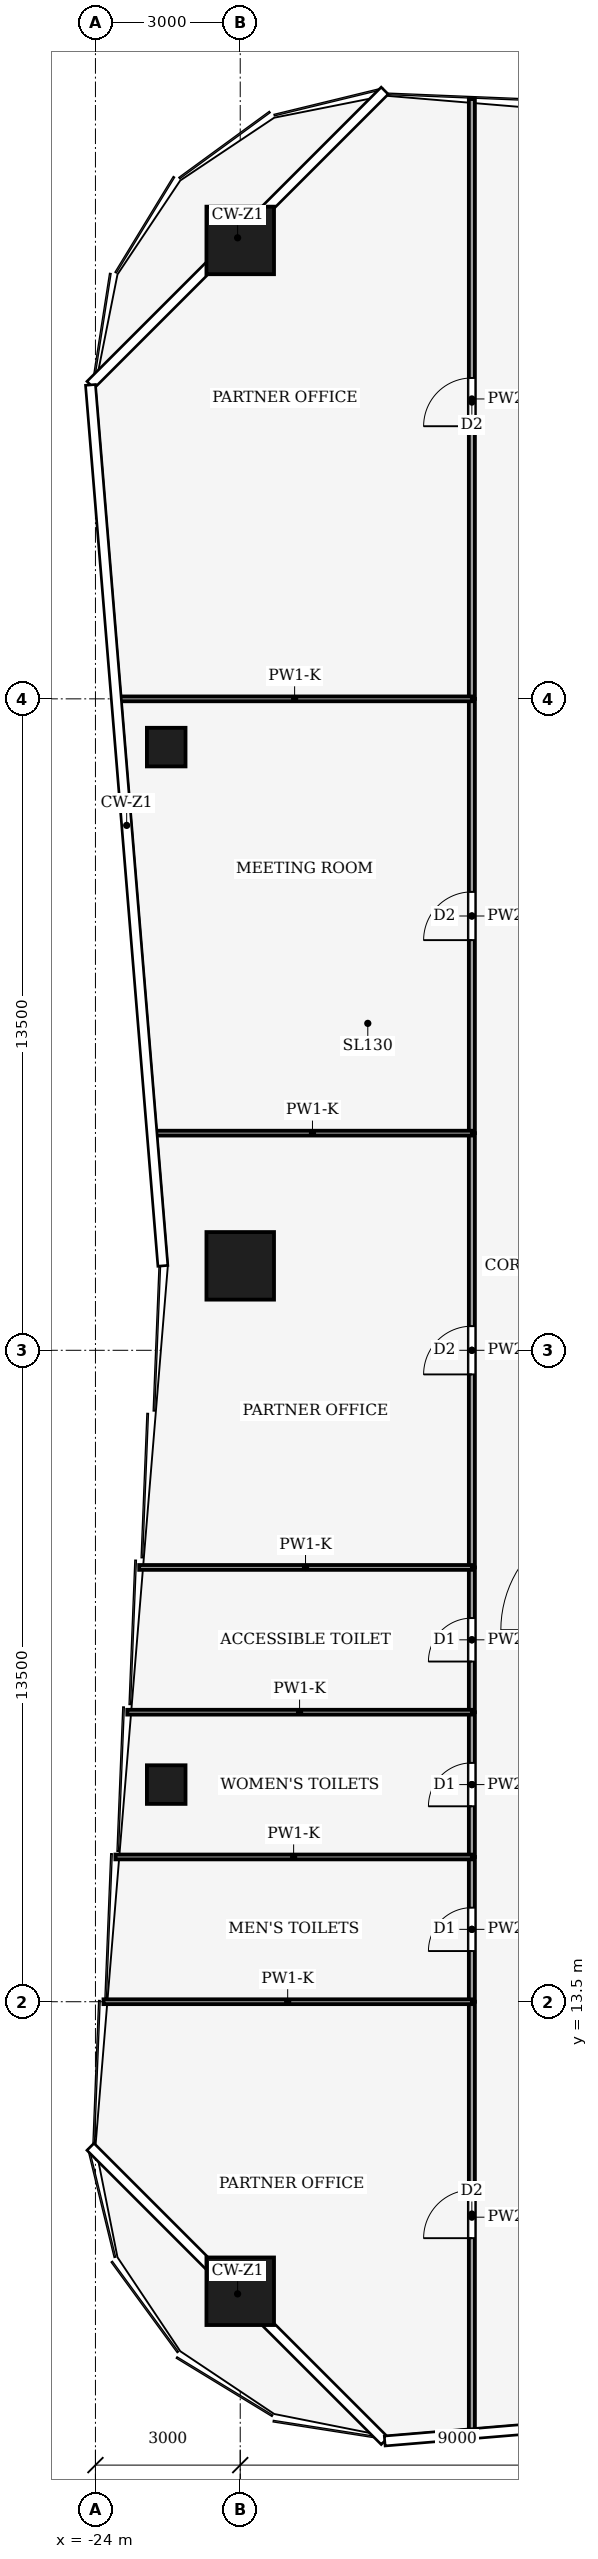
"""IFC4 building model, lengths in metres.
Left out: names, types, materials, properties, quantities, classifications, styles, units other than length and angle.
Written with IfcOpenShell. Run it as: python <this file> out.ifc"""

import sys

from ifc_helpers import new_model, si_unit, direction, frame, frame_2d, origin, origin_2d, place, context, subcontext, project, spatial, rectangle, hollow_rectangle, extrude, element, fill, save


model = new_model("IFC4")
c1 = context("Model", 3, precision=1e-05, world=origin(), true_north=direction((0.0, 1.0)))
c2 = subcontext(c1, "Body", "Model", "MODEL_VIEW")
j1 = project(units=[si_unit("LENGTHUNIT", "METRE"), si_unit("PLANEANGLEUNIT", "RADIAN")], contexts=[c1])
p1 = place(None, origin())
s1 = spatial("IfcSite", under=j1, at=p1, CompositionType="ELEMENT")
p2 = place(p1, origin())
s2 = spatial("IfcBuilding", under=s1, at=p2, CompositionType="ELEMENT")
p3 = place(p2, frame((0.0, 0.0, 110.0)))
s3 = spatial("IfcBuildingStorey", under=s2, at=p3, CompositionType="ELEMENT", Elevation=110.0)
for number, where, z_axis, x_axis in (
    (1, (-21.0, 50.0, 0.0), (0.0, 0.0, 1.0), (1.0, 0.0, 0.0)),
    (2, (-21.0, 7.5, 0.0), (0.0, 0.0, 1.0), (1.0, 0.0, 0.0)),
    (3, (-21.0, 28.75, 0.0), (0.0, 0.0, 1.0), (1.0, 0.0, 0.0)),
):
    element("IfcColumn", number, at=place(p3, frame(where, z_axis=z_axis, x_axis=x_axis)), inside=s3, PredefinedType="COLUMN", context=c2, shape_type="SweptSolid", body=[
        extrude(hollow_rectangle(XDim=1.4, YDim=1.4, WallThickness=0.08, at=origin_2d()), origin(), (0.0, 0.0, 1.0), 4.0),
    ])
for number, where, z_axis, x_axis in (
    (4, (-22.534, 18.0, 0.0), (0.0, 0.0, 1.0), (1.0, 0.0, 0.0)),
    (5, (-22.534, 39.5, 0.0), (0.0, 0.0, 1.0), (1.0, 0.0, 0.0)),
):
    element("IfcColumn", number, at=place(p3, frame(where, z_axis=z_axis, x_axis=x_axis)), inside=s3, PredefinedType="COLUMN", context=c2, shape_type="SweptSolid", body=[
        extrude(hollow_rectangle(XDim=0.8, YDim=0.8, WallThickness=0.04, at=origin_2d()), origin(), (0.0, 0.0, 1.0), 4.0),
    ])
p4 = place(p3, frame((-16.2, 4.57, 0.0), z_axis=(0.0, 0.0, 1.0), x_axis=(0.0, 1.0, 0.0)))
e6 = element("IfcWall", 6, at=p4, inside=s3, PredefinedType="PARTITIONING", context=c2, shape_type="SweptSolid", body=[
    extrude(rectangle(XDim=8.93, YDim=0.125, at=frame_2d((4.465, 0.0))), origin(), (0.0, 0.0, 1.0), 2.92),
])
p5 = place(p4, frame((4.03, 0.0, 0.0)))
e7 = element("IfcOpeningElement", 7, at=p5, cuts=e6, PredefinedType="OPENING", context=c2, shape_type="SweptSolid", body=[
    extrude(rectangle(XDim=1.0, YDim=2.1, at=frame_2d((0.5, 1.05))), frame((0.0, 0.073, 0.0), z_axis=(0.0, -1.0, 0.0), x_axis=(1.0, 0.0, 0.0)), (0.0, 0.0, 1.0), 0.145),
])
p6 = place(p3, frame((-16.2, 13.5, 0.0), z_axis=(0.0, 0.0, 1.0), x_axis=(0.0, 1.0, 0.0)))
e8 = element("IfcWall", 8, at=p6, inside=s3, PredefinedType="PARTITIONING", context=c2, shape_type="SweptSolid", body=[
    extrude(rectangle(XDim=3.0, YDim=0.125, at=frame_2d((1.5, 0.0))), origin(), (0.0, 0.0, 1.0), 3.75),
])
p7 = place(p6, frame((1.05, 0.0, 0.0)))
e9 = element("IfcOpeningElement", 9, at=p7, cuts=e8, PredefinedType="OPENING", context=c2, shape_type="SweptSolid", body=[
    extrude(rectangle(XDim=0.9, YDim=2.1, at=frame_2d((0.45, 1.05))), frame((0.0, 0.073, 0.0), z_axis=(0.0, -1.0, 0.0), x_axis=(1.0, 0.0, 0.0)), (0.0, 0.0, 1.0), 0.145),
])
p8 = place(p3, frame((-16.2, 16.5, 0.0), z_axis=(0.0, 0.0, 1.0), x_axis=(0.0, 1.0, 0.0)))
e10 = element("IfcWall", 10, at=p8, inside=s3, PredefinedType="PARTITIONING", context=c2, shape_type="SweptSolid", body=[
    extrude(rectangle(XDim=3.0, YDim=0.125, at=frame_2d((1.5, 0.0))), origin(), (0.0, 0.0, 1.0), 3.02),
])
p9 = place(p8, frame((1.05, 0.0, 0.0)))
e11 = element("IfcOpeningElement", 11, at=p9, cuts=e10, PredefinedType="OPENING", context=c2, shape_type="SweptSolid", body=[
    extrude(rectangle(XDim=0.9, YDim=2.1, at=frame_2d((0.45, 1.05))), frame((0.0, 0.073, 0.0), z_axis=(0.0, -1.0, 0.0), x_axis=(1.0, 0.0, 0.0)), (0.0, 0.0, 1.0), 0.145),
])
p10 = place(p3, frame((-16.2, 19.5, 0.0), z_axis=(0.0, 0.0, 1.0), x_axis=(0.0, 1.0, 0.0)))
e12 = element("IfcWall", 12, at=p10, inside=s3, PredefinedType="PARTITIONING", context=c2, shape_type="SweptSolid", body=[
    extrude(rectangle(XDim=3.0, YDim=0.125, at=frame_2d((1.5, 0.0))), origin(), (0.0, 0.0, 1.0), 3.75),
])
p11 = place(p10, frame((1.05, 0.0, 0.0)))
e13 = element("IfcOpeningElement", 13, at=p11, cuts=e12, PredefinedType="OPENING", context=c2, shape_type="SweptSolid", body=[
    extrude(rectangle(XDim=0.9, YDim=2.1, at=frame_2d((0.45, 1.05))), frame((0.0, 0.073, 0.0), z_axis=(0.0, -1.0, 0.0), x_axis=(1.0, 0.0, 0.0)), (0.0, 0.0, 1.0), 0.145),
])
p12 = place(p3, frame((-16.2, 22.5, 0.0), z_axis=(0.0, 0.0, 1.0), x_axis=(0.0, 1.0, 0.0)))
e14 = element("IfcWall", 14, at=p12, inside=s3, PredefinedType="PARTITIONING", context=c2, shape_type="SweptSolid", body=[
    extrude(rectangle(XDim=9.0, YDim=0.125, at=frame_2d((4.5, 0.0))), origin(), (0.0, 0.0, 1.0), 3.36),
])
p13 = place(p12, frame((4.0, 0.0, 0.0)))
e15 = element("IfcOpeningElement", 15, at=p13, cuts=e14, PredefinedType="OPENING", context=c2, shape_type="SweptSolid", body=[
    extrude(rectangle(XDim=1.0, YDim=2.1, at=frame_2d((0.5, 1.05))), frame((0.0, 0.073, 0.0), z_axis=(0.0, -1.0, 0.0), x_axis=(1.0, 0.0, 0.0)), (0.0, 0.0, 1.0), 0.145),
])
p14 = place(p3, frame((-16.2, 31.5, 0.0), z_axis=(0.0, 0.0, 1.0), x_axis=(0.0, 1.0, 0.0)))
e16 = element("IfcWall", 16, at=p14, inside=s3, PredefinedType="PARTITIONING", context=c2, shape_type="SweptSolid", body=[
    extrude(rectangle(XDim=9.0, YDim=0.125, at=frame_2d((4.5, 0.0))), origin(), (0.0, 0.0, 1.0), 3.02),
])
p15 = place(p14, frame((4.0, 0.0, 0.0)))
e17 = element("IfcOpeningElement", 17, at=p15, cuts=e16, PredefinedType="OPENING", context=c2, shape_type="SweptSolid", body=[
    extrude(rectangle(XDim=1.0, YDim=2.1, at=frame_2d((0.5, 1.05))), frame((0.0, 0.073, 0.0), z_axis=(0.0, -1.0, 0.0), x_axis=(1.0, 0.0, 0.0)), (0.0, 0.0, 1.0), 0.145),
])
p16 = place(p3, frame((-16.2, 40.5, 0.0), z_axis=(0.0, 0.0, 1.0), x_axis=(0.0, 1.0, 0.0)))
e18 = element("IfcWall", 18, at=p16, inside=s3, PredefinedType="PARTITIONING", context=c2, shape_type="SweptSolid", body=[
    extrude(rectangle(XDim=12.43, YDim=0.125, at=frame_2d((6.215, 0.0))), origin(), (0.0, 0.0, 1.0), 2.92),
])
p17 = place(p16, frame((5.65, 0.0, 0.0)))
e19 = element("IfcOpeningElement", 19, at=p17, cuts=e18, PredefinedType="OPENING", context=c2, shape_type="SweptSolid", body=[
    extrude(rectangle(XDim=1.0, YDim=2.1, at=frame_2d((0.5, 1.05))), frame((0.0, 0.073, 0.0), z_axis=(0.0, -1.0, 0.0), x_axis=(1.0, 0.0, 0.0)), (0.0, 0.0, 1.0), 0.145),
])
p18 = place(p3, frame((-16.2, 13.5, 0.0), z_axis=(0.0, 0.0, 1.0), x_axis=(-1.0, 0.0, 0.0)))
e20 = element("IfcWall", 20, at=p18, inside=s3, PredefinedType="PARTITIONING", context=c2, shape_type="SweptSolid", body=[
    extrude(rectangle(XDim=7.634, YDim=0.1, at=frame_2d((3.817, 0.0))), origin(), (0.0, 0.0, 1.0), 2.92),
])
p19 = place(p3, frame((-16.2, 16.5, 0.0), z_axis=(0.0, 0.0, 1.0), x_axis=(-1.0, 0.0, 0.0)))
e21 = element("IfcWall", 21, at=p19, inside=s3, PredefinedType="PARTITIONING", context=c2, shape_type="SweptSolid", body=[
    extrude(rectangle(XDim=7.387, YDim=0.1, at=frame_2d((3.693, 0.0))), origin(), (0.0, 0.0, 1.0), 2.92),
])
p20 = place(p3, frame((-16.2, 19.5, 0.0), z_axis=(0.0, 0.0, 1.0), x_axis=(-1.0, 0.0, 0.0)))
e22 = element("IfcWall", 22, at=p20, inside=s3, PredefinedType="PARTITIONING", context=c2, shape_type="SweptSolid", body=[
    extrude(rectangle(XDim=7.14, YDim=0.1, at=frame_2d((3.57, 0.0))), origin(), (0.0, 0.0, 1.0), 2.92),
])
p21 = place(p3, frame((-16.2, 22.5, 0.0), z_axis=(0.0, 0.0, 1.0), x_axis=(-1.0, 0.0, 0.0)))
e23 = element("IfcWall", 23, at=p21, inside=s3, PredefinedType="PARTITIONING", context=c2, shape_type="SweptSolid", body=[
    extrude(rectangle(XDim=6.894, YDim=0.1, at=frame_2d((3.447, 0.0))), origin(), (0.0, 0.0, 1.0), 2.92),
])
p22 = place(p3, frame((-16.2, 31.5, 0.0), z_axis=(0.0, 0.0, 1.0), x_axis=(-1.0, 0.0, 0.0)))
e24 = element("IfcWall", 24, at=p22, inside=s3, PredefinedType="PARTITIONING", context=c2, shape_type="SweptSolid", body=[
    extrude(rectangle(XDim=6.606, YDim=0.1, at=frame_2d((3.303, 0.0))), origin(), (0.0, 0.0, 1.0), 2.92),
])
p23 = place(p3, frame((-16.2, 40.5, 0.0), z_axis=(0.0, 0.0, 1.0), x_axis=(-1.0, 0.0, 0.0)))
e25 = element("IfcWall", 25, at=p23, inside=s3, PredefinedType="PARTITIONING", context=c2, shape_type="SweptSolid", body=[
    extrude(rectangle(XDim=7.346, YDim=0.1, at=frame_2d((3.673, 0.0))), origin(), (0.0, 0.0, 1.0), 2.92),
])
p24 = place(p5, origin())
e26 = element("IfcDoor", 26, at=p24, inside=s3, OperationType="SINGLE_SWING_RIGHT", PredefinedType="DOOR", context=c2, shape_type="SweptSolid", body=[
    extrude(rectangle(XDim=1.0, YDim=2.1, at=frame_2d((0.5, 1.05))), frame((0.0, 0.025, 0.0), z_axis=(0.0, -1.0, 0.0), x_axis=(1.0, 0.0, 0.0)), (0.0, 0.0, 1.0), 0.05),
])
fill(e7, e26)
p25 = place(p7, origin())
e27 = element("IfcDoor", 27, at=p25, inside=s3, OperationType="SINGLE_SWING_RIGHT", PredefinedType="DOOR", context=c2, shape_type="SweptSolid", body=[
    extrude(rectangle(XDim=0.9, YDim=2.1, at=frame_2d((0.45, 1.05))), frame((0.0, 0.025, 0.0), z_axis=(0.0, -1.0, 0.0), x_axis=(1.0, 0.0, 0.0)), (0.0, 0.0, 1.0), 0.05),
])
fill(e9, e27)
p26 = place(p9, origin())
e28 = element("IfcDoor", 28, at=p26, inside=s3, OperationType="SINGLE_SWING_LEFT", PredefinedType="DOOR", context=c2, shape_type="SweptSolid", body=[
    extrude(rectangle(XDim=0.9, YDim=2.1, at=frame_2d((0.45, 1.05))), frame((0.0, 0.025, 0.0), z_axis=(0.0, -1.0, 0.0), x_axis=(1.0, 0.0, 0.0)), (0.0, 0.0, 1.0), 0.05),
])
fill(e11, e28)
p27 = place(p11, origin())
e29 = element("IfcDoor", 29, at=p27, inside=s3, OperationType="SINGLE_SWING_RIGHT", PredefinedType="DOOR", context=c2, shape_type="SweptSolid", body=[
    extrude(rectangle(XDim=0.9, YDim=2.1, at=frame_2d((0.45, 1.05))), frame((0.0, 0.025, 0.0), z_axis=(0.0, -1.0, 0.0), x_axis=(1.0, 0.0, 0.0)), (0.0, 0.0, 1.0), 0.05),
])
fill(e13, e29)
p28 = place(p13, origin())
e30 = element("IfcDoor", 30, at=p28, inside=s3, OperationType="SINGLE_SWING_LEFT", PredefinedType="DOOR", context=c2, shape_type="SweptSolid", body=[
    extrude(rectangle(XDim=1.0, YDim=2.1, at=frame_2d((0.5, 1.05))), frame((0.0, 0.025, 0.0), z_axis=(0.0, -1.0, 0.0), x_axis=(1.0, 0.0, 0.0)), (0.0, 0.0, 1.0), 0.05),
])
fill(e15, e30)
p29 = place(p15, origin())
e31 = element("IfcDoor", 31, at=p29, inside=s3, OperationType="SINGLE_SWING_RIGHT", PredefinedType="DOOR", context=c2, shape_type="SweptSolid", body=[
    extrude(rectangle(XDim=1.0, YDim=2.1, at=frame_2d((0.5, 1.05))), frame((0.0, 0.025, 0.0), z_axis=(0.0, -1.0, 0.0), x_axis=(1.0, 0.0, 0.0)), (0.0, 0.0, 1.0), 0.05),
])
fill(e17, e31)
p30 = place(p17, origin())
e32 = element("IfcDoor", 32, at=p30, inside=s3, OperationType="SINGLE_SWING_LEFT", PredefinedType="DOOR", context=c2, shape_type="SweptSolid", body=[
    extrude(rectangle(XDim=1.0, YDim=2.1, at=frame_2d((0.5, 1.05))), frame((0.0, 0.025, 0.0), z_axis=(0.0, -1.0, 0.0), x_axis=(1.0, 0.0, 0.0)), (0.0, 0.0, 1.0), 0.05),
])
fill(e19, e32)
save(model, sys.argv[1])
